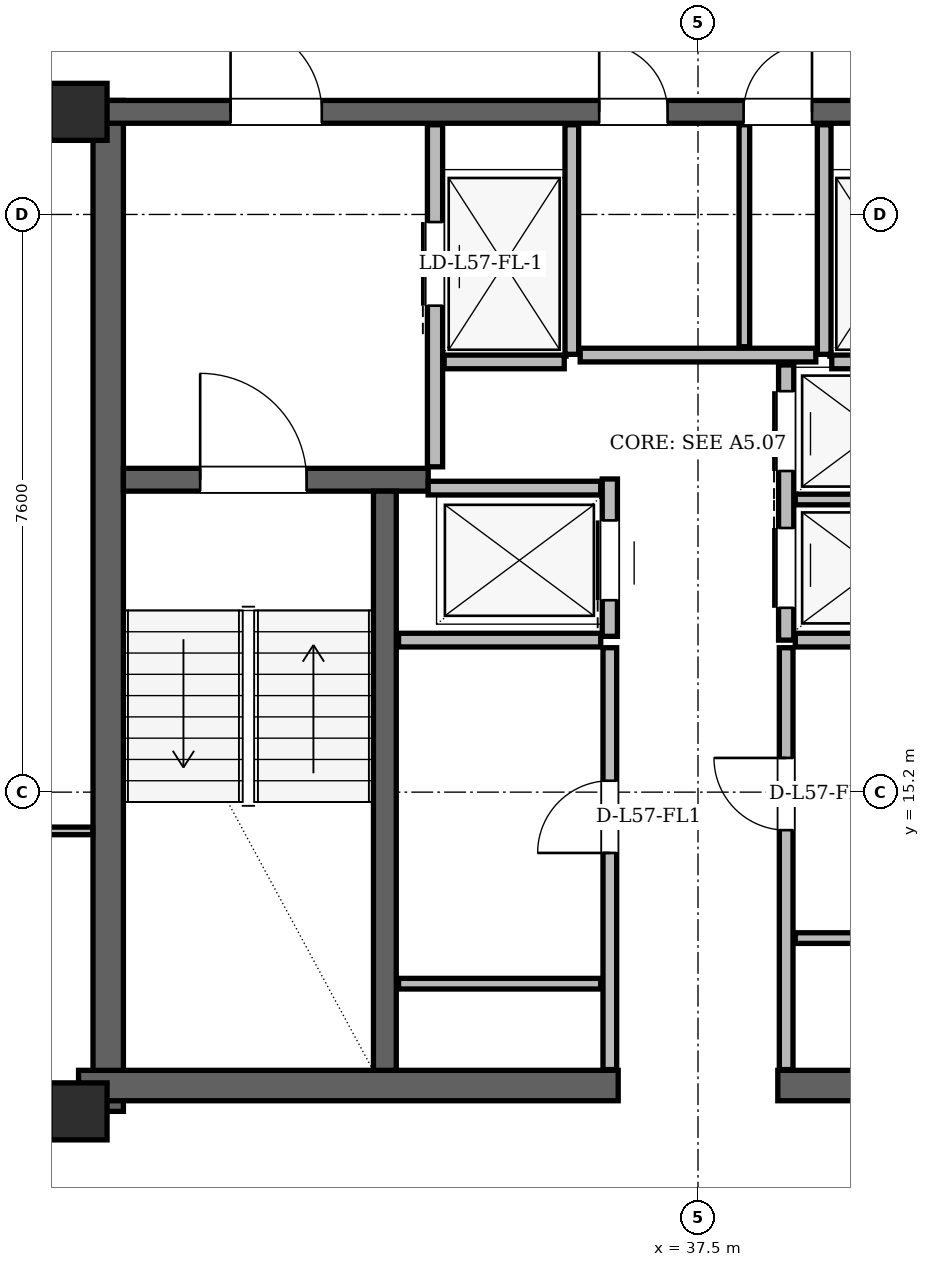
"""IFC4 building model, lengths in metres.
Left out: names, types, materials, properties, quantities, classifications, styles, units other than length and angle.
Written with IfcOpenShell. Run it as: python <this file> out.ifc"""

import sys

from ifc_helpers import new_model, si_unit, direction, frame, frame_2d, origin, origin_2d, place, context, subcontext, project, spatial, rectangle, hollow_rectangle, extrude, element, fill, save


model = new_model("IFC4")
c1 = context("Model", 3, precision=1e-05, world=origin(), true_north=direction((0.0, 1.0)))
c2 = subcontext(c1, "Body", "Model", "MODEL_VIEW")
j1 = project(units=[si_unit("LENGTHUNIT", "METRE"), si_unit("PLANEANGLEUNIT", "RADIAN")], contexts=[c1])
p1 = place(None, origin())
s1 = spatial("IfcSite", under=j1, at=p1, CompositionType="ELEMENT")
p2 = place(p1, origin())
s2 = spatial("IfcBuilding", under=s1, at=p2, CompositionType="ELEMENT")
p3 = place(p2, frame((0.0, 0.0, 216.3)))
s3 = spatial("IfcBuildingStorey", under=s2, at=p3, CompositionType="ELEMENT", Elevation=216.3)
for number, where, z_axis, x_axis in (
    (1, (29.35, 11.0, 0.0), (0.0, 0.0, 1.0), (1.0, 0.0, 0.0)),
    (2, (29.35, 24.15, 0.0), (0.0, 0.0, 1.0), (1.0, 0.0, 0.0)),
):
    element("IfcColumn", number, at=place(p3, frame(where, z_axis=z_axis, x_axis=x_axis)), inside=s3, PredefinedType="COLUMN", context=c2, shape_type="SweptSolid", body=[
        extrude(hollow_rectangle(XDim=0.75, YDim=0.75, WallThickness=0.06, at=origin_2d()), origin(), (0.0, 0.0, 1.0), 3.6),
    ])
p4 = place(p3, frame((29.74, 11.0, 0.0), z_axis=(0.0, 0.0, 1.0), x_axis=(0.0, 1.0, 0.0)))
e3 = element("IfcWall", 3, at=p4, inside=s3, PredefinedType="SHEAR", context=c2, shape_type="SweptSolid", body=[
    extrude(rectangle(XDim=13.3, YDim=0.4, at=frame_2d((6.65, 0.0))), origin(), (0.0, 0.0, 1.0), 3.38),
])
for number, where, z_axis, x_axis in (
    (4, (29.35, 11.34, 0.0), (0.0, 0.0, 1.0), (1.0, 0.0, 0.0)),
    (5, (38.55, 11.34, 0.0), (0.0, 0.0, 1.0), (1.0, 0.0, 0.0)),
):
    element("IfcWall", number, at=place(p3, frame(where, z_axis=z_axis, x_axis=x_axis)), inside=s3, PredefinedType="SHEAR", context=c2, shape_type="SweptSolid", body=[
        extrude(rectangle(XDim=7.1, YDim=0.4, at=frame_2d((3.55, 0.0))), origin(), (0.0, 0.0, 1.0), 3.38),
    ])
p5 = place(p3, frame((29.65, 24.15, 0.0), z_axis=(0.0, 0.0, 1.0), x_axis=(1.0, 0.0, 0.0)))
e6 = element("IfcWall", 6, at=p5, inside=s3, PredefinedType="SHEAR", context=c2, shape_type="SweptSolid", body=[
    extrude(rectangle(XDim=15.7, YDim=0.3, at=frame_2d((7.85, 0.0))), origin(), (0.0, 0.0, 1.0), 3.38),
])
p6 = place(p5, frame((1.7, 0.0, 0.0)))
e7 = element("IfcOpeningElement", 7, at=p6, cuts=e6, PredefinedType="OPENING", context=c2, shape_type="SweptSolid", body=[
    extrude(rectangle(XDim=1.2, YDim=2.2, at=frame_2d((0.6, 1.1))), frame((0.0, 0.15, 0.0), z_axis=(0.0, -1.0, 0.0), x_axis=(1.0, 0.0, 0.0)), (0.0, 0.0, 1.0), 0.3),
])
p7 = place(p5, frame((12.8, 0.0, 0.0)))
e8 = element("IfcOpeningElement", 8, at=p7, cuts=e6, PredefinedType="OPENING", context=c2, shape_type="SweptSolid", body=[
    extrude(rectangle(XDim=1.2, YDim=2.2, at=frame_2d((0.6, 1.1))), frame((0.0, 0.15, 0.0), z_axis=(0.0, -1.0, 0.0), x_axis=(1.0, 0.0, 0.0)), (0.0, 0.0, 1.0), 0.3),
])
p8 = place(p5, frame((6.55, 0.0, 0.0)))
e9 = element("IfcOpeningElement", 9, at=p8, cuts=e6, PredefinedType="OPENING", context=c2, shape_type="SweptSolid", body=[
    extrude(rectangle(XDim=0.9, YDim=2.05, at=frame_2d((0.45, 1.025))), frame((0.0, 0.15, 0.0), z_axis=(0.0, -1.0, 0.0), x_axis=(1.0, 0.0, 0.0)), (0.0, 0.0, 1.0), 0.3),
])
p9 = place(p5, frame((8.45, 0.0, 0.0)))
e10 = element("IfcOpeningElement", 10, at=p9, cuts=e6, PredefinedType="OPENING", context=c2, shape_type="SweptSolid", body=[
    extrude(rectangle(XDim=0.9, YDim=2.05, at=frame_2d((0.45, 1.025))), frame((0.0, 0.15, 0.0), z_axis=(0.0, -1.0, 0.0), x_axis=(1.0, 0.0, 0.0)), (0.0, 0.0, 1.0), 0.3),
])
p10 = place(p3, frame((29.94, 19.31, 0.0), z_axis=(0.0, 0.0, 1.0), x_axis=(1.0, 0.0, 0.0)))
e11 = element("IfcWall", 11, at=p10, inside=s3, PredefinedType="SHEAR", context=c2, shape_type="SweptSolid", body=[
    extrude(rectangle(XDim=4.01, YDim=0.3, at=frame_2d((2.005, 0.0))), origin(), (0.0, 0.0, 1.0), 3.38),
])
p11 = place(p10, frame((1.01, 0.0, 0.0)))
e12 = element("IfcOpeningElement", 12, at=p11, cuts=e11, PredefinedType="OPENING", context=c2, shape_type="SweptSolid", body=[
    extrude(rectangle(XDim=1.4, YDim=2.2, at=frame_2d((0.7, 1.1))), frame((0.0, 0.15, 0.0), z_axis=(0.0, -1.0, 0.0), x_axis=(1.0, 0.0, 0.0)), (0.0, 0.0, 1.0), 0.3),
])
p12 = place(p3, frame((33.38, 11.54, 0.0), z_axis=(0.0, 0.0, 1.0), x_axis=(0.0, 1.0, 0.0)))
e13 = element("IfcWall", 13, at=p12, inside=s3, PredefinedType="SHEAR", context=c2, shape_type="SweptSolid", body=[
    extrude(rectangle(XDim=7.62, YDim=0.3, at=frame_2d((3.81, 0.0))), origin(), (0.0, 0.0, 1.0), 3.38),
])
p13 = place(p3, frame((34.132, 43.163, 0.0), z_axis=(0.0, 0.0, 1.0), x_axis=(-0.500000353019, -0.866025199969, 0.0)))
e14 = element("IfcWall", 14, at=p13, inside=s3, PredefinedType="SOLIDWALL", context=c2, shape_type="SweptSolid", body=[
    extrude(rectangle(XDim=36.579, YDim=0.29, at=frame_2d((18.289, 0.0))), origin(), (0.0, 0.0, 1.0), 2.677),
])
p14 = place(p13, frame((3.429, 0.0, 0.0)))
e15 = element("IfcOpeningElement", 15, at=p14, cuts=e14, PredefinedType="OPENING", context=c2, shape_type="SweptSolid", body=[
    extrude(rectangle(XDim=1.5, YDim=2.2, at=frame_2d((0.75, 1.1))), frame((0.0, 0.145, 0.0), z_axis=(0.0, -1.0, 0.0), x_axis=(1.0, 0.0, 0.0)), (0.0, 0.0, 1.0), 0.29),
])
p15 = place(p13, frame((27.044, 0.0, 0.0)))
e16 = element("IfcOpeningElement", 16, at=p15, cuts=e14, PredefinedType="OPENING", context=c2, shape_type="SweptSolid", body=[
    extrude(rectangle(XDim=1.5, YDim=2.2, at=frame_2d((0.75, 1.1))), frame((0.0, 0.145, 0.0), z_axis=(0.0, -1.0, 0.0), x_axis=(1.0, 0.0, 0.0)), (0.0, 0.0, 1.0), 0.29),
])
p16 = place(p13, frame((22.914, 0.0, 0.85)))
e17 = element("IfcOpeningElement", 17, at=p16, cuts=e14, PredefinedType="OPENING", context=c2, shape_type="SweptSolid", body=[
    extrude(rectangle(XDim=1.2, YDim=1.48, at=frame_2d((0.6, 0.74))), frame((0.0, 0.145, 0.0), z_axis=(0.0, -1.0, 0.0), x_axis=(1.0, 0.0, 0.0)), (0.0, 0.0, 1.0), 0.29),
])
p17 = place(p13, frame((33.08, 0.0, 0.85)))
e18 = element("IfcOpeningElement", 18, at=p17, cuts=e14, PredefinedType="OPENING", context=c2, shape_type="SweptSolid", body=[
    extrude(rectangle(XDim=1.2, YDim=1.48, at=frame_2d((0.6, 0.74))), frame((0.0, 0.145, 0.0), z_axis=(0.0, -1.0, 0.0), x_axis=(1.0, 0.0, 0.0)), (0.0, 0.0, 1.0), 0.29),
])
p18 = place(p13, frame((8.479, 0.0, 0.85)))
e19 = element("IfcOpeningElement", 19, at=p18, cuts=e14, PredefinedType="OPENING", context=c2, shape_type="SweptSolid", body=[
    extrude(rectangle(XDim=1.2, YDim=1.48, at=frame_2d((0.6, 0.74))), frame((0.0, 0.145, 0.0), z_axis=(0.0, -1.0, 0.0), x_axis=(1.0, 0.0, 0.0)), (0.0, 0.0, 1.0), 0.29),
])
p19 = place(p13, frame((15.537, 0.0, 0.85)))
e20 = element("IfcOpeningElement", 20, at=p19, cuts=e14, PredefinedType="OPENING", context=c2, shape_type="SweptSolid", body=[
    extrude(rectangle(XDim=2.8, YDim=1.717, at=frame_2d((1.4, 0.858))), frame((0.0, 0.145, 0.0), z_axis=(0.0, -1.0, 0.0), x_axis=(1.0, 0.0, 0.0)), (0.0, 0.0, 1.0), 0.29),
])
p20 = place(p13, frame((1.501, 0.0, 0.85)))
e21 = element("IfcOpeningElement", 21, at=p20, cuts=e14, PredefinedType="OPENING", context=c2, shape_type="SweptSolid", body=[
    extrude(rectangle(XDim=1.2, YDim=1.48, at=frame_2d((0.6, 0.74))), frame((0.0, 0.145, 0.0), z_axis=(0.0, -1.0, 0.0), x_axis=(1.0, 0.0, 0.0)), (0.0, 0.0, 1.0), 0.29),
])
p21 = place(p3, frame((34.04, 19.48, 0.0), z_axis=(0.0, 0.0, 1.0), x_axis=(0.0, 1.0, 0.0)))
e22 = element("IfcWall", 22, at=p21, inside=s3, PredefinedType="PARTITIONING", context=c2, shape_type="SweptSolid", body=[
    extrude(rectangle(XDim=4.5, YDim=0.2, at=frame_2d((2.25, 0.0))), origin(), (0.0, 0.0, 1.0), 3.38),
])
p22 = place(p21, frame((2.12, 0.0, 0.0)))
e23 = element("IfcOpeningElement", 23, at=p22, cuts=e22, PredefinedType="OPENING", context=c2, shape_type="SweptSolid", body=[
    extrude(rectangle(XDim=1.1, YDim=2.2, at=frame_2d((0.55, 1.1))), frame((0.0, 0.1, 0.0), z_axis=(0.0, -1.0, 0.0), x_axis=(1.0, 0.0, 0.0)), (0.0, 0.0, 1.0), 0.2),
])
p23 = place(p3, frame((35.84, 20.96, 0.0), z_axis=(0.0, 0.0, 1.0), x_axis=(0.0, 1.0, 0.0)))
e24 = element("IfcWall", 24, at=p23, inside=s3, PredefinedType="PARTITIONING", context=c2, shape_type="SweptSolid", body=[
    extrude(rectangle(XDim=3.02, YDim=0.18, at=frame_2d((1.51, 0.0))), origin(), (0.0, 0.0, 1.0), 3.38),
])
p24 = place(p3, frame((34.16, 20.86, 0.0), z_axis=(0.0, 0.0, 1.0), x_axis=(1.0, 0.0, 0.0)))
e25 = element("IfcWall", 25, at=p24, inside=s3, PredefinedType="PARTITIONING", context=c2, shape_type="SweptSolid", body=[
    extrude(rectangle(XDim=1.58, YDim=0.18, at=frame_2d((0.79, 0.0))), origin(), (0.0, 0.0, 1.0), 3.38),
])
p25 = place(p3, frame((39.16, 20.96, 0.0), z_axis=(0.0, 0.0, 1.0), x_axis=(0.0, 1.0, 0.0)))
e26 = element("IfcWall", 26, at=p25, inside=s3, PredefinedType="PARTITIONING", context=c2, shape_type="SweptSolid", body=[
    extrude(rectangle(XDim=3.02, YDim=0.18, at=frame_2d((1.51, 0.0))), origin(), (0.0, 0.0, 1.0), 3.38),
])
p26 = place(p3, frame((39.26, 20.86, 0.0), z_axis=(0.0, 0.0, 1.0), x_axis=(1.0, 0.0, 0.0)))
e27 = element("IfcWall", 27, at=p26, inside=s3, PredefinedType="PARTITIONING", context=c2, shape_type="SweptSolid", body=[
    extrude(rectangle(XDim=1.58, YDim=0.18, at=frame_2d((0.79, 0.0))), origin(), (0.0, 0.0, 1.0), 3.38),
])
p27 = place(p3, frame((36.34, 17.25, 0.0), z_axis=(0.0, 0.0, 1.0), x_axis=(0.0, 1.0, 0.0)))
e28 = element("IfcWall", 28, at=p27, inside=s3, PredefinedType="PARTITIONING", context=c2, shape_type="SweptSolid", body=[
    extrude(rectangle(XDim=2.07, YDim=0.2, at=frame_2d((1.035, 0.0))), origin(), (0.0, 0.0, 1.0), 3.38),
])
p28 = place(p27, frame((0.475, 0.0, 0.0)))
e29 = element("IfcOpeningElement", 29, at=p28, cuts=e28, PredefinedType="OPENING", context=c2, shape_type="SweptSolid", body=[
    extrude(rectangle(XDim=1.05, YDim=2.15, at=frame_2d((0.525, 1.075))), frame((0.0, 0.1, 0.0), z_axis=(0.0, -1.0, 0.0), x_axis=(1.0, 0.0, 0.0)), (0.0, 0.0, 1.0), 0.2),
])
p29 = place(p3, frame((33.95, 19.2, 0.0), z_axis=(0.0, 0.0, 1.0), x_axis=(1.0, 0.0, 0.0)))
e30 = element("IfcWall", 30, at=p29, inside=s3, PredefinedType="PARTITIONING", context=c2, shape_type="SweptSolid", body=[
    extrude(rectangle(XDim=2.27, YDim=0.18, at=frame_2d((1.135, 0.0))), origin(), (0.0, 0.0, 1.0), 3.38),
])
p30 = place(p3, frame((33.56, 17.2, 0.0), z_axis=(0.0, 0.0, 1.0), x_axis=(1.0, 0.0, 0.0)))
e31 = element("IfcWall", 31, at=p30, inside=s3, PredefinedType="PARTITIONING", context=c2, shape_type="SweptSolid", body=[
    extrude(rectangle(XDim=2.66, YDim=0.18, at=frame_2d((1.33, 0.0))), origin(), (0.0, 0.0, 1.0), 3.38),
])
p31 = place(p3, frame((36.34, 11.55, 0.0), z_axis=(0.0, 0.0, 1.0), x_axis=(0.0, 1.0, 0.0)))
e32 = element("IfcWall", 32, at=p31, inside=s3, PredefinedType="PARTITIONING", context=c2, shape_type="SweptSolid", body=[
    extrude(rectangle(XDim=5.55, YDim=0.18, at=frame_2d((2.775, 0.0))), origin(), (0.0, 0.0, 1.0), 3.38),
])
p32 = place(p31, frame((2.85, 0.0, 0.0)))
e33 = element("IfcOpeningElement", 33, at=p32, cuts=e32, PredefinedType="OPENING", context=c2, shape_type="SweptSolid", body=[
    extrude(rectangle(XDim=0.95, YDim=2.1, at=frame_2d((0.475, 1.05))), frame((0.0, 0.09, 0.0), z_axis=(0.0, -1.0, 0.0), x_axis=(1.0, 0.0, 0.0)), (0.0, 0.0, 1.0), 0.18),
])
p33 = place(p3, frame((33.56, 12.68, 0.0), z_axis=(0.0, 0.0, 1.0), x_axis=(1.0, 0.0, 0.0)))
e34 = element("IfcWall", 34, at=p33, inside=s3, PredefinedType="PARTITIONING", context=c2, shape_type="SweptSolid", body=[
    extrude(rectangle(XDim=2.66, YDim=0.14, at=frame_2d((1.33, 0.0))), origin(), (0.0, 0.0, 1.0), 3.38),
])
p34 = place(p3, frame((38.66, 17.2, 0.0), z_axis=(0.0, 0.0, 1.0), x_axis=(0.0, 1.0, 0.0)))
e35 = element("IfcWall", 35, at=p34, inside=s3, PredefinedType="PARTITIONING", context=c2, shape_type="SweptSolid", body=[
    extrude(rectangle(XDim=3.62, YDim=0.2, at=frame_2d((1.81, 0.0))), origin(), (0.0, 0.0, 1.0), 3.38),
])
p35 = place(p34, frame((0.425, 0.0, 0.0)))
e36 = element("IfcOpeningElement", 36, at=p35, cuts=e35, PredefinedType="OPENING", context=c2, shape_type="SweptSolid", body=[
    extrude(rectangle(XDim=1.05, YDim=2.15, at=frame_2d((0.525, 1.075))), frame((0.0, 0.1, 0.0), z_axis=(0.0, -1.0, 0.0), x_axis=(1.0, 0.0, 0.0)), (0.0, 0.0, 1.0), 0.2),
])
p36 = place(p34, frame((2.225, 0.0, 0.0)))
e37 = element("IfcOpeningElement", 37, at=p36, cuts=e35, PredefinedType="OPENING", context=c2, shape_type="SweptSolid", body=[
    extrude(rectangle(XDim=1.05, YDim=2.15, at=frame_2d((0.525, 1.075))), frame((0.0, 0.1, 0.0), z_axis=(0.0, -1.0, 0.0), x_axis=(1.0, 0.0, 0.0)), (0.0, 0.0, 1.0), 0.2),
])
p37 = place(p3, frame((38.78, 17.2, 0.0), z_axis=(0.0, 0.0, 1.0), x_axis=(1.0, 0.0, 0.0)))
e38 = element("IfcWall", 38, at=p37, inside=s3, PredefinedType="PARTITIONING", context=c2, shape_type="SweptSolid", body=[
    extrude(rectangle(XDim=2.66, YDim=0.18, at=frame_2d((1.33, 0.0))), origin(), (0.0, 0.0, 1.0), 3.38),
])
p38 = place(p3, frame((38.78, 19.05, 0.0), z_axis=(0.0, 0.0, 1.0), x_axis=(1.0, 0.0, 0.0)))
e39 = element("IfcWall", 39, at=p38, inside=s3, PredefinedType="PARTITIONING", context=c2, shape_type="SweptSolid", body=[
    extrude(rectangle(XDim=2.66, YDim=0.14, at=frame_2d((1.33, 0.0))), origin(), (0.0, 0.0, 1.0), 3.38),
])
p39 = place(p3, frame((38.66, 11.55, 0.0), z_axis=(0.0, 0.0, 1.0), x_axis=(0.0, 1.0, 0.0)))
e40 = element("IfcWall", 40, at=p39, inside=s3, PredefinedType="PARTITIONING", context=c2, shape_type="SweptSolid", body=[
    extrude(rectangle(XDim=5.55, YDim=0.18, at=frame_2d((2.775, 0.0))), origin(), (0.0, 0.0, 1.0), 3.38),
])
p40 = place(p39, frame((3.15, 0.0, 0.0)))
e41 = element("IfcOpeningElement", 41, at=p40, cuts=e40, PredefinedType="OPENING", context=c2, shape_type="SweptSolid", body=[
    extrude(rectangle(XDim=0.95, YDim=2.1, at=frame_2d((0.475, 1.05))), frame((0.0, 0.09, 0.0), z_axis=(0.0, -1.0, 0.0), x_axis=(1.0, 0.0, 0.0)), (0.0, 0.0, 1.0), 0.18),
])
p41 = place(p3, frame((38.78, 13.28, 0.0), z_axis=(0.0, 0.0, 1.0), x_axis=(1.0, 0.0, 0.0)))
e42 = element("IfcWall", 42, at=p41, inside=s3, PredefinedType="PARTITIONING", context=c2, shape_type="SweptSolid", body=[
    extrude(rectangle(XDim=2.66, YDim=0.14, at=frame_2d((1.33, 0.0))), origin(), (0.0, 0.0, 1.0), 3.38),
])
p42 = place(p3, frame((35.95, 20.95, 0.0), z_axis=(0.0, 0.0, 1.0), x_axis=(1.0, 0.0, 0.0)))
e43 = element("IfcWall", 43, at=p42, inside=s3, PredefinedType="PARTITIONING", context=c2, shape_type="SweptSolid", body=[
    extrude(rectangle(XDim=3.1, YDim=0.18, at=frame_2d((1.55, 0.0))), origin(), (0.0, 0.0, 1.0), 3.38),
])
p43 = place(p3, frame((38.11, 21.06, 0.0), z_axis=(0.0, 0.0, 1.0), x_axis=(0.0, 1.0, 0.0)))
e44 = element("IfcWall", 44, at=p43, inside=s3, PredefinedType="PARTITIONING", context=c2, shape_type="SweptSolid", body=[
    extrude(rectangle(XDim=2.92, YDim=0.14, at=frame_2d((1.46, 0.0))), origin(), (0.0, 0.0, 1.0), 3.38),
])
p44 = place(p3, frame((17.865, 14.69, 0.0), z_axis=(0.0, 0.0, 1.0), x_axis=(1.0, 0.0, 0.0)))
e45 = element("IfcWall", 45, at=p44, inside=s3, PredefinedType="PARTITIONING", context=c2, shape_type="SweptSolid", body=[
    extrude(rectangle(XDim=11.671, YDim=0.1, at=frame_2d((5.835, 0.0))), origin(), (0.0, 0.0, 1.0), 2.52),
])
p45 = place(p44, frame((0.493, 0.0, 0.0)))
e46 = element("IfcOpeningElement", 46, at=p45, cuts=e45, PredefinedType="OPENING", context=c2, shape_type="SweptSolid", body=[
    extrude(rectangle(XDim=0.88, YDim=2.08, at=frame_2d((0.44, 1.04))), frame((0.0, 0.05, 0.0), z_axis=(0.0, -1.0, 0.0), x_axis=(1.0, 0.0, 0.0)), (0.0, 0.0, 1.0), 0.1),
])
p46 = place(p44, frame((2.637, 0.0, 0.0)))
e47 = element("IfcOpeningElement", 47, at=p46, cuts=e45, PredefinedType="OPENING", context=c2, shape_type="SweptSolid", body=[
    extrude(rectangle(XDim=0.95, YDim=2.1, at=frame_2d((0.475, 1.05))), frame((0.0, 0.05, 0.0), z_axis=(0.0, -1.0, 0.0), x_axis=(1.0, 0.0, 0.0)), (0.0, 0.0, 1.0), 0.1),
])
p47 = place(p44, frame((5.412, 0.0, 0.0)))
e48 = element("IfcOpeningElement", 48, at=p47, cuts=e45, PredefinedType="OPENING", context=c2, shape_type="SweptSolid", body=[
    extrude(rectangle(XDim=0.95, YDim=2.1, at=frame_2d((0.475, 1.05))), frame((0.0, 0.05, 0.0), z_axis=(0.0, -1.0, 0.0), x_axis=(1.0, 0.0, 0.0)), (0.0, 0.0, 1.0), 0.1),
])
p48 = place(p44, frame((9.135, 0.0, 0.0)))
e49 = element("IfcOpeningElement", 49, at=p48, cuts=e45, PredefinedType="OPENING", context=c2, shape_type="SweptSolid", body=[
    extrude(rectangle(XDim=0.92, YDim=2.12, at=frame_2d((0.46, 1.06))), frame((0.0, 0.05, 0.0), z_axis=(0.0, -1.0, 0.0), x_axis=(1.0, 0.0, 0.0)), (0.0, 0.0, 1.0), 0.1),
])
p49 = place(p32, origin())
e50 = element("IfcDoor", 50, at=p49, inside=s3, OperationType="SINGLE_SWING_LEFT", PredefinedType="DOOR", context=c2, shape_type="SweptSolid", body=[
    extrude(rectangle(XDim=0.95, YDim=2.1, at=frame_2d((0.475, 1.05))), frame((0.0, 0.025, 0.0), z_axis=(0.0, -1.0, 0.0), x_axis=(1.0, 0.0, 0.0)), (0.0, 0.0, 1.0), 0.05),
])
fill(e33, e50)
p50 = place(p40, origin())
e51 = element("IfcDoor", 51, at=p50, inside=s3, OperationType="SINGLE_SWING_RIGHT", PredefinedType="DOOR", context=c2, shape_type="SweptSolid", body=[
    extrude(rectangle(XDim=0.95, YDim=2.1, at=frame_2d((0.475, 1.05))), frame((0.0, 0.025, 0.0), z_axis=(0.0, -1.0, 0.0), x_axis=(1.0, 0.0, 0.0)), (0.0, 0.0, 1.0), 0.05),
])
fill(e41, e51)
p51 = place(p22, origin())
e52 = element("IfcDoor", 52, at=p51, inside=s3, OperationType="SLIDING_TO_LEFT", PredefinedType="DOOR", context=c2, shape_type="SweptSolid", body=[
    extrude(rectangle(XDim=1.1, YDim=2.2, at=frame_2d((0.55, 1.1))), frame((0.0, 0.025, 0.0), z_axis=(0.0, -1.0, 0.0), x_axis=(1.0, 0.0, 0.0)), (0.0, 0.0, 1.0), 0.05),
])
fill(e23, e52)
p52 = place(p28, origin())
e53 = element("IfcDoor", 53, at=p52, inside=s3, OperationType="SLIDING_TO_LEFT", PredefinedType="DOOR", context=c2, shape_type="SweptSolid", body=[
    extrude(rectangle(XDim=1.05, YDim=2.15, at=frame_2d((0.525, 1.075))), frame((0.0, 0.025, 0.0), z_axis=(0.0, -1.0, 0.0), x_axis=(1.0, 0.0, 0.0)), (0.0, 0.0, 1.0), 0.05),
])
fill(e29, e53)
p53 = place(p35, origin())
e54 = element("IfcDoor", 54, at=p53, inside=s3, OperationType="SLIDING_TO_RIGHT", PredefinedType="DOOR", context=c2, shape_type="SweptSolid", body=[
    extrude(rectangle(XDim=1.05, YDim=2.15, at=frame_2d((0.525, 1.075))), frame((0.0, 0.025, 0.0), z_axis=(0.0, -1.0, 0.0), x_axis=(1.0, 0.0, 0.0)), (0.0, 0.0, 1.0), 0.05),
])
fill(e36, e54)
p54 = place(p36, origin())
e55 = element("IfcDoor", 55, at=p54, inside=s3, OperationType="SLIDING_TO_LEFT", PredefinedType="DOOR", context=c2, shape_type="SweptSolid", body=[
    extrude(rectangle(XDim=1.05, YDim=2.15, at=frame_2d((0.525, 1.075))), frame((0.0, 0.025, 0.0), z_axis=(0.0, -1.0, 0.0), x_axis=(1.0, 0.0, 0.0)), (0.0, 0.0, 1.0), 0.05),
])
fill(e37, e55)
p55 = place(p11, origin())
e56 = element("IfcDoor", 56, at=p55, inside=s3, OperationType="SINGLE_SWING_LEFT", PredefinedType="DOOR", context=c2, shape_type="SweptSolid", body=[
    extrude(rectangle(XDim=1.4, YDim=2.2, at=frame_2d((0.7, 1.1))), frame((0.0, 0.025, 0.0), z_axis=(0.0, -1.0, 0.0), x_axis=(1.0, 0.0, 0.0)), (0.0, 0.0, 1.0), 0.05),
])
fill(e12, e56)
p56 = place(p6, origin())
e57 = element("IfcDoor", 57, at=p56, inside=s3, OperationType="SINGLE_SWING_LEFT", PredefinedType="DOOR", context=c2, shape_type="SweptSolid", body=[
    extrude(rectangle(XDim=1.2, YDim=2.2, at=frame_2d((0.6, 1.1))), frame((0.0, 0.025, 0.0), z_axis=(0.0, -1.0, 0.0), x_axis=(1.0, 0.0, 0.0)), (0.0, 0.0, 1.0), 0.05),
])
fill(e7, e57)
p57 = place(p8, origin())
e58 = element("IfcDoor", 58, at=p57, inside=s3, OperationType="SINGLE_SWING_LEFT", PredefinedType="DOOR", context=c2, shape_type="SweptSolid", body=[
    extrude(rectangle(XDim=0.9, YDim=2.05, at=frame_2d((0.45, 1.025))), frame((0.0, 0.025, 0.0), z_axis=(0.0, -1.0, 0.0), x_axis=(1.0, 0.0, 0.0)), (0.0, 0.0, 1.0), 0.05),
])
fill(e9, e58)
p58 = place(p9, origin())
e59 = element("IfcDoor", 59, at=p58, inside=s3, OperationType="SINGLE_SWING_RIGHT", PredefinedType="DOOR", context=c2, shape_type="SweptSolid", body=[
    extrude(rectangle(XDim=0.9, YDim=2.05, at=frame_2d((0.45, 1.025))), frame((0.0, 0.025, 0.0), z_axis=(0.0, -1.0, 0.0), x_axis=(1.0, 0.0, 0.0)), (0.0, 0.0, 1.0), 0.05),
])
fill(e10, e59)
save(model, sys.argv[1])
